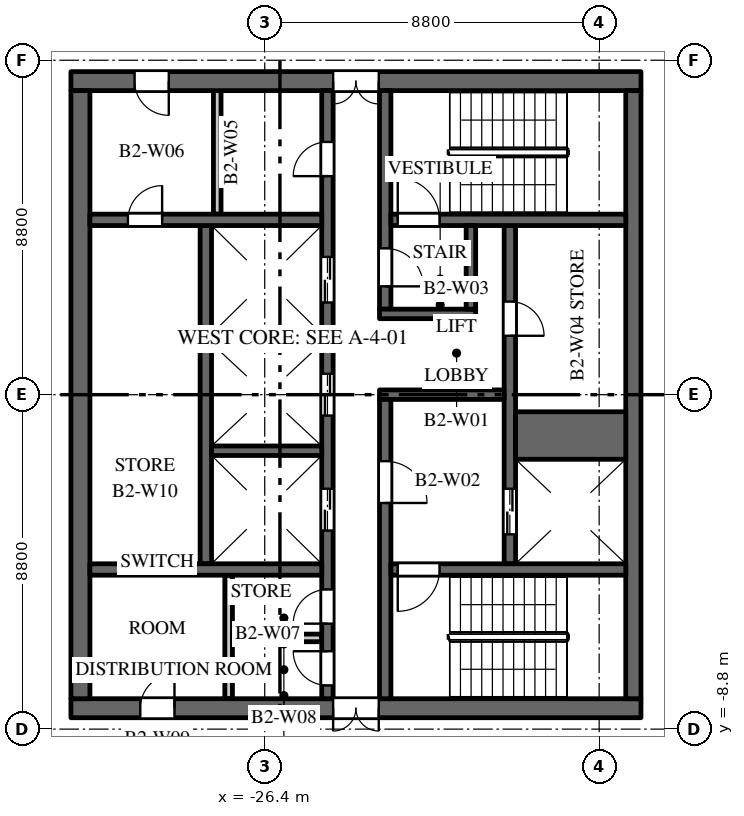
"""IFC4 building model, lengths in metres.
Left out: names, types, materials, properties, quantities, classifications, styles, units other than length and angle.
Written with IfcOpenShell. Run it as: python <this file> out.ifc"""

import sys

from ifc_helpers import new_model, si_unit, direction, frame, frame_2d, origin, place, context, subcontext, project, spatial, rectangle, extrude, element, fill, save


model = new_model("IFC4")
c1 = context("Model", 3, precision=1e-05, world=origin(), true_north=direction((0.0, 1.0)))
c2 = subcontext(c1, "Body", "Model", "MODEL_VIEW")
j1 = project(units=[si_unit("LENGTHUNIT", "METRE"), si_unit("PLANEANGLEUNIT", "RADIAN")], contexts=[c1])
p1 = place(None, origin())
s1 = spatial("IfcSite", under=j1, at=p1, CompositionType="ELEMENT")
p2 = place(p1, origin())
s2 = spatial("IfcBuilding", under=s1, at=p2, CompositionType="ELEMENT")
p3 = place(p2, frame((0.0, 0.0, -8.4)))
s3 = spatial("IfcBuildingStorey", under=s2, at=p3, CompositionType="ELEMENT", Elevation=-8.4)
p4 = place(p3, frame((-16.5, 8.25, 0.0), z_axis=(0.0, 0.0, 1.0), x_axis=(-1.0, 0.0, 0.0)))
e1 = element("IfcWall", 1, at=p4, inside=s3, PredefinedType="SHEAR", context=c2, shape_type="SweptSolid", body=[
    extrude(rectangle(XDim=15.0, YDim=0.5, at=frame_2d((7.5, 0.0))), origin(), (0.0, 0.0, 1.0), 3.9),
])
p5 = place(p4, frame((6.9, 0.0, 0.0)))
e2 = element("IfcOpeningElement", 2, at=p5, cuts=e1, PredefinedType="OPENING", context=c2, shape_type="SweptSolid", body=[
    extrude(rectangle(XDim=1.2, YDim=2.1, at=frame_2d((0.6, 1.05))), frame((0.0, 0.26, 0.0), z_axis=(0.0, -1.0, 0.0), x_axis=(1.0, 0.0, 0.0)), (0.0, 0.0, 1.0), 0.52),
])
p6 = place(p4, frame((12.425, 0.0, 0.0)))
e3 = element("IfcOpeningElement", 3, at=p6, cuts=e1, PredefinedType="OPENING", context=c2, shape_type="SweptSolid", body=[
    extrude(rectangle(XDim=0.9, YDim=2.1, at=frame_2d((0.45, 1.05))), frame((0.0, 0.26, 0.0), z_axis=(0.0, -1.0, 0.0), x_axis=(1.0, 0.0, 0.0)), (0.0, 0.0, 1.0), 0.52),
])
p7 = place(p3, frame((-16.5, -8.25, 0.0), z_axis=(0.0, 0.0, 1.0), x_axis=(-1.0, 0.0, 0.0)))
e4 = element("IfcWall", 4, at=p7, inside=s3, PredefinedType="SHEAR", context=c2, shape_type="SweptSolid", body=[
    extrude(rectangle(XDim=15.0, YDim=0.5, at=frame_2d((7.5, 0.0))), origin(), (0.0, 0.0, 1.0), 3.9),
])
p8 = place(p7, frame((6.9, 0.0, 0.0)))
e5 = element("IfcOpeningElement", 5, at=p8, cuts=e4, PredefinedType="OPENING", context=c2, shape_type="SweptSolid", body=[
    extrude(rectangle(XDim=1.2, YDim=2.1, at=frame_2d((0.6, 1.05))), frame((0.0, 0.26, 0.0), z_axis=(0.0, -1.0, 0.0), x_axis=(1.0, 0.0, 0.0)), (0.0, 0.0, 1.0), 0.52),
])
p9 = place(p7, frame((12.275, 0.0, 0.0)))
e6 = element("IfcOpeningElement", 6, at=p9, cuts=e4, PredefinedType="OPENING", context=c2, shape_type="SweptSolid", body=[
    extrude(rectangle(XDim=0.9, YDim=2.1, at=frame_2d((0.45, 1.05))), frame((0.0, 0.26, 0.0), z_axis=(0.0, -1.0, 0.0), x_axis=(1.0, 0.0, 0.0)), (0.0, 0.0, 1.0), 0.52),
])
p10 = place(p3, frame((-27.95, -4.45, 0.0), z_axis=(0.0, 0.0, 1.0), x_axis=(0.0, 1.0, 0.0)))
e7 = element("IfcWall", 7, at=p10, inside=s3, PredefinedType="SHEAR", context=c2, shape_type="SweptSolid", body=[
    extrude(rectangle(XDim=8.9, YDim=0.3, at=frame_2d((4.45, 0.0))), origin(), (0.0, 0.0, 1.0), 3.9),
])
p11 = place(p3, frame((-19.95, -4.45, 0.0), z_axis=(0.0, 0.0, 1.0), x_axis=(0.0, 1.0, 0.0)))
e8 = element("IfcWall", 8, at=p11, inside=s3, PredefinedType="SHEAR", context=c2, shape_type="SweptSolid", body=[
    extrude(rectangle(XDim=8.9, YDim=0.3, at=frame_2d((4.45, 0.0))), origin(), (0.0, 0.0, 1.0), 3.9),
])
p12 = place(p11, frame((0.775, 0.0, 0.0)))
e9 = element("IfcOpeningElement", 9, at=p12, cuts=e8, PredefinedType="OPENING", context=c2, shape_type="SweptSolid", body=[
    extrude(rectangle(XDim=1.2, YDim=2.1, at=frame_2d((0.6, 1.05))), frame((0.0, 0.16, 0.0), z_axis=(0.0, -1.0, 0.0), x_axis=(1.0, 0.0, 0.0)), (0.0, 0.0, 1.0), 0.32),
])
p13 = place(p11, frame((6.0, 0.0, 0.0)))
e10 = element("IfcOpeningElement", 10, at=p13, cuts=e8, PredefinedType="OPENING", context=c2, shape_type="SweptSolid", body=[
    extrude(rectangle(XDim=0.9, YDim=2.1, at=frame_2d((0.45, 1.05))), frame((0.0, 0.16, 0.0), z_axis=(0.0, -1.0, 0.0), x_axis=(1.0, 0.0, 0.0)), (0.0, 0.0, 1.0), 0.32),
])
p14 = place(p3, frame((-24.75, -8.0, 0.0), z_axis=(0.0, 0.0, 1.0), x_axis=(0.0, 1.0, 0.0)))
e11 = element("IfcWall", 11, at=p14, inside=s3, PredefinedType="SHEAR", context=c2, shape_type="SweptSolid", body=[
    extrude(rectangle(XDim=16.0, YDim=0.3, at=frame_2d((8.0, 0.0))), origin(), (0.0, 0.0, 1.0), 3.9),
])
p15 = place(p14, frame((4.425, 0.0, 0.0)))
e12 = element("IfcOpeningElement", 12, at=p15, cuts=e11, PredefinedType="OPENING", context=c2, shape_type="SweptSolid", body=[
    extrude(rectangle(XDim=1.1, YDim=2.1, at=frame_2d((0.55, 1.05))), frame((0.0, 0.16, 0.0), z_axis=(0.0, -1.0, 0.0), x_axis=(1.0, 0.0, 0.0)), (0.0, 0.0, 1.0), 0.32),
])
p16 = place(p14, frame((7.45, 0.0, 0.0)))
e13 = element("IfcOpeningElement", 13, at=p16, cuts=e11, PredefinedType="OPENING", context=c2, shape_type="SweptSolid", body=[
    extrude(rectangle(XDim=1.1, YDim=2.1, at=frame_2d((0.55, 1.05))), frame((0.0, 0.16, 0.0), z_axis=(0.0, -1.0, 0.0), x_axis=(1.0, 0.0, 0.0)), (0.0, 0.0, 1.0), 0.32),
])
p17 = place(p14, frame((10.425, 0.0, 0.0)))
e14 = element("IfcOpeningElement", 14, at=p17, cuts=e11, PredefinedType="OPENING", context=c2, shape_type="SweptSolid", body=[
    extrude(rectangle(XDim=1.2, YDim=2.1, at=frame_2d((0.6, 1.05))), frame((0.0, 0.16, 0.0), z_axis=(0.0, -1.0, 0.0), x_axis=(1.0, 0.0, 0.0)), (0.0, 0.0, 1.0), 0.32),
])
p18 = place(p14, frame((13.75, 0.0, 0.0)))
e15 = element("IfcOpeningElement", 15, at=p18, cuts=e11, PredefinedType="OPENING", context=c2, shape_type="SweptSolid", body=[
    extrude(rectangle(XDim=0.9, YDim=2.1, at=frame_2d((0.45, 1.05))), frame((0.0, 0.16, 0.0), z_axis=(0.0, -1.0, 0.0), x_axis=(1.0, 0.0, 0.0)), (0.0, 0.0, 1.0), 0.32),
])
p19 = place(p14, frame((1.975, 0.0, 0.0)))
e16 = element("IfcOpeningElement", 16, at=p19, cuts=e11, PredefinedType="OPENING", context=c2, shape_type="SweptSolid", body=[
    extrude(rectangle(XDim=0.9, YDim=2.1, at=frame_2d((0.45, 1.05))), frame((0.0, 0.16, 0.0), z_axis=(0.0, -1.0, 0.0), x_axis=(1.0, 0.0, 0.0)), (0.0, 0.0, 1.0), 0.32),
])
p20 = place(p14, frame((0.35, 0.0, 0.0)))
e17 = element("IfcOpeningElement", 17, at=p20, cuts=e11, PredefinedType="OPENING", context=c2, shape_type="SweptSolid", body=[
    extrude(rectangle(XDim=0.9, YDim=2.1, at=frame_2d((0.45, 1.05))), frame((0.0, 0.16, 0.0), z_axis=(0.0, -1.0, 0.0), x_axis=(1.0, 0.0, 0.0)), (0.0, 0.0, 1.0), 0.32),
])
p21 = place(p3, frame((-20.1, 0.0, 0.0), z_axis=(0.0, 0.0, 1.0), x_axis=(-1.0, 0.0, 0.0)))
e18 = element("IfcWall", 18, at=p21, inside=s3, PredefinedType="SHEAR", context=c2, shape_type="SweptSolid", body=[
    extrude(rectangle(XDim=3.28, YDim=0.25, at=frame_2d((1.64, 0.0))), origin(), (0.0, 0.0, 1.0), 3.9),
])
p22 = place(p3, frame((-16.7, -8.0, 0.0), z_axis=(0.0, 0.0, 1.0), x_axis=(0.0, 1.0, 0.0)))
e19 = element("IfcWall", 19, at=p22, inside=s3, PredefinedType="SHEAR", context=c2, shape_type="SweptSolid", body=[
    extrude(rectangle(XDim=16.0, YDim=0.4, at=frame_2d((8.0, 0.0))), origin(), (0.0, 0.0, 1.0), 3.9),
])
p23 = place(p3, frame((-31.25, -8.0, 0.0), z_axis=(0.0, 0.0, 1.0), x_axis=(0.0, 1.0, 0.0)))
e20 = element("IfcWall", 20, at=p23, inside=s3, PredefinedType="SHEAR", context=c2, shape_type="SweptSolid", body=[
    extrude(rectangle(XDim=16.0, YDim=0.5, at=frame_2d((8.0, 0.0))), origin(), (0.0, 0.0, 1.0), 3.9),
])
p24 = place(p3, frame((-24.9, 4.6, 0.0), z_axis=(0.0, 0.0, 1.0), x_axis=(-1.0, 0.0, 0.0)))
e21 = element("IfcWall", 21, at=p24, inside=s3, PredefinedType="SHEAR", context=c2, shape_type="SweptSolid", body=[
    extrude(rectangle(XDim=6.1, YDim=0.3, at=frame_2d((3.05, 0.0))), origin(), (0.0, 0.0, 1.0), 3.9),
])
p25 = place(p24, frame((4.2, 0.0, 0.0)))
e22 = element("IfcOpeningElement", 22, at=p25, cuts=e21, PredefinedType="OPENING", context=c2, shape_type="SweptSolid", body=[
    extrude(rectangle(XDim=0.9, YDim=2.1, at=frame_2d((0.45, 1.05))), frame((0.0, 0.16, 0.0), z_axis=(0.0, -1.0, 0.0), x_axis=(1.0, 0.0, 0.0)), (0.0, 0.0, 1.0), 0.32),
])
for number, where, z_axis, x_axis in (
    (23, (-27.65, 4.75, 0.0), (0.0, 0.0, 1.0), (0.0, 1.0, 0.0)),
    (24, (-27.35, -8.0, 0.0), (0.0, 0.0, 1.0), (0.0, 1.0, 0.0)),
):
    element("IfcWall", number, at=place(p3, frame(where, z_axis=z_axis, x_axis=x_axis)), inside=s3, PredefinedType="PARTITIONING", context=c2, shape_type="SweptSolid", body=[
        extrude(rectangle(XDim=3.25, YDim=0.2, at=frame_2d((1.625, 0.0))), origin(), (0.0, 0.0, 1.0), 3.9),
    ])
p26 = place(p3, frame((-24.9, -6.4, 0.0), z_axis=(0.0, 0.0, 1.0), x_axis=(-1.0, 0.0, 0.0)))
e25 = element("IfcWall", 25, at=p26, inside=s3, PredefinedType="PARTITIONING", context=c2, shape_type="SweptSolid", body=[
    extrude(rectangle(XDim=2.35, YDim=0.2, at=frame_2d((1.175, 0.0))), origin(), (0.0, 0.0, 1.0), 3.9),
])
p27 = place(p3, frame((-24.9, -4.6, 0.0), z_axis=(0.0, 0.0, 1.0), x_axis=(-1.0, 0.0, 0.0)))
e26 = element("IfcWall", 26, at=p27, inside=s3, PredefinedType="SHEAR", context=c2, shape_type="SweptSolid", body=[
    extrude(rectangle(XDim=6.1, YDim=0.3, at=frame_2d((3.05, 0.0))), origin(), (0.0, 0.0, 1.0), 3.9),
])
p28 = place(p3, frame((-16.9, -1.075, 0.0), z_axis=(0.0, 0.0, 1.0), x_axis=(-1.0, 0.0, 0.0)))
e27 = element("IfcWall", 27, at=p28, inside=s3, PredefinedType="SHEAR", context=c2, shape_type="SweptSolid", body=[
    extrude(rectangle(XDim=2.9, YDim=1.25, at=frame_2d((1.45, 0.0))), origin(), (0.0, 0.0, 1.0), 3.9),
])
for number, where, z_axis, x_axis in (
    (28, (-24.9, -1.475, 0.0), (0.0, 0.0, 1.0), (-1.0, 0.0, 0.0)),
    (29, (-24.9, 1.475, 0.0), (0.0, 0.0, 1.0), (-1.0, 0.0, 0.0)),
):
    element("IfcWall", number, at=place(p3, frame(where, z_axis=z_axis, x_axis=x_axis)), inside=s3, PredefinedType="SHEAR", context=c2, shape_type="SweptSolid", body=[
        extrude(rectangle(XDim=2.9, YDim=0.25, at=frame_2d((1.45, 0.0))), origin(), (0.0, 0.0, 1.0), 3.9),
    ])
p29 = place(p3, frame((-23.23, 2.25, 0.0), z_axis=(0.0, 0.0, 1.0), x_axis=(0.0, 1.0, 0.0)))
e30 = element("IfcWall", 30, at=p29, inside=s3, PredefinedType="SHEAR", context=c2, shape_type="SweptSolid", body=[
    extrude(rectangle(XDim=5.75, YDim=0.3, at=frame_2d((2.875, 0.0))), origin(), (0.0, 0.0, 1.0), 3.9),
])
p30 = place(p29, frame((0.6, 0.0, 0.0)))
e31 = element("IfcOpeningElement", 31, at=p30, cuts=e30, PredefinedType="OPENING", context=c2, shape_type="SweptSolid", body=[
    extrude(rectangle(XDim=1.0, YDim=2.1, at=frame_2d((0.5, 1.05))), frame((0.0, 0.16, 0.0), z_axis=(0.0, -1.0, 0.0), x_axis=(1.0, 0.0, 0.0)), (0.0, 0.0, 1.0), 0.32),
])
p31 = place(p3, frame((-23.23, -8.0, 0.0), z_axis=(0.0, 0.0, 1.0), x_axis=(0.0, 1.0, 0.0)))
e32 = element("IfcWall", 32, at=p31, inside=s3, PredefinedType="SHEAR", context=c2, shape_type="SweptSolid", body=[
    extrude(rectangle(XDim=7.875, YDim=0.3, at=frame_2d((3.938, 0.0))), origin(), (0.0, 0.0, 1.0), 3.9),
])
p32 = place(p31, frame((5.15, 0.0, 0.0)))
e33 = element("IfcOpeningElement", 33, at=p32, cuts=e32, PredefinedType="OPENING", context=c2, shape_type="SweptSolid", body=[
    extrude(rectangle(XDim=1.1, YDim=2.1, at=frame_2d((0.55, 1.05))), frame((0.0, 0.16, 0.0), z_axis=(0.0, -1.0, 0.0), x_axis=(1.0, 0.0, 0.0)), (0.0, 0.0, 1.0), 0.32),
])
p33 = place(p3, frame((-16.9, 4.6, 0.0), z_axis=(0.0, 0.0, 1.0), x_axis=(-1.0, 0.0, 0.0)))
e34 = element("IfcWall", 34, at=p33, inside=s3, PredefinedType="SHEAR", context=c2, shape_type="SweptSolid", body=[
    extrude(rectangle(XDim=6.18, YDim=0.3, at=frame_2d((3.09, 0.0))), origin(), (0.0, 0.0, 1.0), 3.9),
])
p34 = place(p33, frame((4.9, 0.0, 0.0)))
e35 = element("IfcOpeningElement", 35, at=p34, cuts=e34, PredefinedType="OPENING", context=c2, shape_type="SweptSolid", body=[
    extrude(rectangle(XDim=1.1, YDim=2.1, at=frame_2d((0.55, 1.05))), frame((0.0, 0.16, 0.0), z_axis=(0.0, -1.0, 0.0), x_axis=(1.0, 0.0, 0.0)), (0.0, 0.0, 1.0), 0.32),
])
p35 = place(p3, frame((-16.9, -4.6, 0.0), z_axis=(0.0, 0.0, 1.0), x_axis=(-1.0, 0.0, 0.0)))
e36 = element("IfcWall", 36, at=p35, inside=s3, PredefinedType="SHEAR", context=c2, shape_type="SweptSolid", body=[
    extrude(rectangle(XDim=6.18, YDim=0.3, at=frame_2d((3.09, 0.0))), origin(), (0.0, 0.0, 1.0), 3.9),
])
p36 = place(p35, frame((4.9, 0.0, 0.0)))
e37 = element("IfcOpeningElement", 37, at=p36, cuts=e36, PredefinedType="OPENING", context=c2, shape_type="SweptSolid", body=[
    extrude(rectangle(XDim=1.1, YDim=2.1, at=frame_2d((0.55, 1.05))), frame((0.0, 0.16, 0.0), z_axis=(0.0, -1.0, 0.0), x_axis=(1.0, 0.0, 0.0)), (0.0, 0.0, 1.0), 0.32),
])
p37 = place(p3, frame((-20.85, 2.125, 0.0), z_axis=(0.0, 0.0, 1.0), x_axis=(-1.0, 0.0, 0.0)))
e38 = element("IfcWall", 38, at=p37, inside=s3, PredefinedType="SHEAR", context=c2, shape_type="SweptSolid", body=[
    extrude(rectangle(XDim=2.53, YDim=0.25, at=frame_2d((1.265, 0.0))), origin(), (0.0, 0.0, 1.0), 3.9),
])
p38 = place(p3, frame((-20.975, 2.25, 0.0), z_axis=(0.0, 0.0, 1.0), x_axis=(0.0, 1.0, 0.0)))
e39 = element("IfcWall", 39, at=p38, inside=s3, PredefinedType="SHEAR", context=c2, shape_type="SweptSolid", body=[
    extrude(rectangle(XDim=2.2, YDim=0.25, at=frame_2d((1.1, 0.0))), origin(), (0.0, 0.0, 1.0), 3.9),
])
p39 = place(p3, frame((-31.157, 11.729, 0.0), z_axis=(0.0, 0.0, 1.0), x_axis=(-0.462265314279, -0.886741664305, 0.0)))
e40 = element("IfcWall", 40, at=p39, inside=s3, PredefinedType="SOLIDWALL", context=c2, shape_type="SweptSolid", body=[
    extrude(rectangle(XDim=4.135, YDim=0.25, at=frame_2d((2.067, 0.0))), origin(), (0.0, 0.0, 1.0), 3.0),
])
p40 = place(p39, frame((1.467, 0.0, 0.0)))
e41 = element("IfcOpeningElement", 41, at=p40, cuts=e40, PredefinedType="OPENING", context=c2, shape_type="SweptSolid", body=[
    extrude(rectangle(XDim=1.2, YDim=2.1, at=frame_2d((0.6, 1.05))), frame((0.0, 0.135, 0.0), z_axis=(0.0, -1.0, 0.0), x_axis=(1.0, 0.0, 0.0)), (0.0, 0.0, 1.0), 0.27),
])
p41 = place(p3, frame((-33.069, -8.062, 0.0), z_axis=(0.0, 0.0, 1.0), x_axis=(0.462265314279, -0.886741664305, 0.0)))
e42 = element("IfcWall", 42, at=p41, inside=s3, PredefinedType="SOLIDWALL", context=c2, shape_type="SweptSolid", body=[
    extrude(rectangle(XDim=4.135, YDim=0.25, at=frame_2d((2.067, 0.0))), origin(), (0.0, 0.0, 1.0), 3.0),
])
p42 = place(p12, origin())
e43 = element("IfcDoor", 43, at=p42, inside=s3, OperationType="DOUBLE_DOOR_SLIDING", PredefinedType="DOOR", context=c2, shape_type="SweptSolid", body=[
    extrude(rectangle(XDim=1.2, YDim=2.1, at=frame_2d((0.6, 1.05))), frame((0.0, 0.025, 0.0), z_axis=(0.0, -1.0, 0.0), x_axis=(1.0, 0.0, 0.0)), (0.0, 0.0, 1.0), 0.05),
])
fill(e9, e43)
p43 = place(p15, origin())
e44 = element("IfcDoor", 44, at=p43, inside=s3, OperationType="DOUBLE_DOOR_SLIDING", PredefinedType="DOOR", context=c2, shape_type="SweptSolid", body=[
    extrude(rectangle(XDim=1.1, YDim=2.1, at=frame_2d((0.55, 1.05))), frame((0.0, 0.025, 0.0), z_axis=(0.0, -1.0, 0.0), x_axis=(1.0, 0.0, 0.0)), (0.0, 0.0, 1.0), 0.05),
])
fill(e12, e44)
p44 = place(p16, origin())
e45 = element("IfcDoor", 45, at=p44, inside=s3, OperationType="DOUBLE_DOOR_SLIDING", PredefinedType="DOOR", context=c2, shape_type="SweptSolid", body=[
    extrude(rectangle(XDim=1.1, YDim=2.1, at=frame_2d((0.55, 1.05))), frame((0.0, 0.025, 0.0), z_axis=(0.0, -1.0, 0.0), x_axis=(1.0, 0.0, 0.0)), (0.0, 0.0, 1.0), 0.05),
])
fill(e13, e45)
p45 = place(p17, origin())
e46 = element("IfcDoor", 46, at=p45, inside=s3, OperationType="DOUBLE_DOOR_SLIDING", PredefinedType="DOOR", context=c2, shape_type="SweptSolid", body=[
    extrude(rectangle(XDim=1.2, YDim=2.1, at=frame_2d((0.6, 1.05))), frame((0.0, 0.025, 0.0), z_axis=(0.0, -1.0, 0.0), x_axis=(1.0, 0.0, 0.0)), (0.0, 0.0, 1.0), 0.05),
])
fill(e14, e46)
p46 = place(p34, origin())
e47 = element("IfcDoor", 47, at=p46, inside=s3, OperationType="SINGLE_SWING_RIGHT", PredefinedType="DOOR", context=c2, shape_type="SweptSolid", body=[
    extrude(rectangle(XDim=1.1, YDim=2.1, at=frame_2d((0.55, 1.05))), frame((0.0, 0.025, 0.0), z_axis=(0.0, -1.0, 0.0), x_axis=(1.0, 0.0, 0.0)), (0.0, 0.0, 1.0), 0.05),
])
fill(e35, e47)
p47 = place(p36, origin())
e48 = element("IfcDoor", 48, at=p47, inside=s3, OperationType="SINGLE_SWING_LEFT", PredefinedType="DOOR", context=c2, shape_type="SweptSolid", body=[
    extrude(rectangle(XDim=1.1, YDim=2.1, at=frame_2d((0.55, 1.05))), frame((0.0, 0.025, 0.0), z_axis=(0.0, -1.0, 0.0), x_axis=(1.0, 0.0, 0.0)), (0.0, 0.0, 1.0), 0.05),
])
fill(e37, e48)
p48 = place(p32, origin())
e49 = element("IfcDoor", 49, at=p48, inside=s3, OperationType="SINGLE_SWING_LEFT", PredefinedType="DOOR", context=c2, shape_type="SweptSolid", body=[
    extrude(rectangle(XDim=1.1, YDim=2.1, at=frame_2d((0.55, 1.05))), frame((0.0, 0.025, 0.0), z_axis=(0.0, -1.0, 0.0), x_axis=(1.0, 0.0, 0.0)), (0.0, 0.0, 1.0), 0.05),
])
fill(e33, e49)
p49 = place(p30, origin())
e50 = element("IfcDoor", 50, at=p49, inside=s3, OperationType="SINGLE_SWING_LEFT", PredefinedType="DOOR", context=c2, shape_type="SweptSolid", body=[
    extrude(rectangle(XDim=1.0, YDim=2.1, at=frame_2d((0.5, 1.05))), frame((0.0, 0.025, 0.0), z_axis=(0.0, -1.0, 0.0), x_axis=(1.0, 0.0, 0.0)), (0.0, 0.0, 1.0), 0.05),
])
fill(e31, e50)
p50 = place(p5, origin())
e51 = element("IfcDoor", 51, at=p50, inside=s3, OperationType="DOUBLE_DOOR_DOUBLE_SWING", PredefinedType="DOOR", context=c2, shape_type="SweptSolid", body=[
    extrude(rectangle(XDim=1.2, YDim=2.1, at=frame_2d((0.6, 1.05))), frame((0.0, 0.025, 0.0), z_axis=(0.0, -1.0, 0.0), x_axis=(1.0, 0.0, 0.0)), (0.0, 0.0, 1.0), 0.05),
])
fill(e2, e51)
p51 = place(p8, origin())
e52 = element("IfcDoor", 52, at=p51, inside=s3, OperationType="DOUBLE_DOOR_DOUBLE_SWING", PredefinedType="DOOR", context=c2, shape_type="SweptSolid", body=[
    extrude(rectangle(XDim=1.2, YDim=2.1, at=frame_2d((0.6, 1.05))), frame((0.0, 0.025, 0.0), z_axis=(0.0, -1.0, 0.0), x_axis=(1.0, 0.0, 0.0)), (0.0, 0.0, 1.0), 0.05),
])
fill(e5, e52)
p52 = place(p13, origin())
e53 = element("IfcDoor", 53, at=p52, inside=s3, OperationType="SINGLE_SWING_LEFT", PredefinedType="DOOR", context=c2, shape_type="SweptSolid", body=[
    extrude(rectangle(XDim=0.9, YDim=2.1, at=frame_2d((0.45, 1.05))), frame((0.0, 0.025, 0.0), z_axis=(0.0, -1.0, 0.0), x_axis=(1.0, 0.0, 0.0)), (0.0, 0.0, 1.0), 0.05),
])
fill(e10, e53)
p53 = place(p18, origin())
e54 = element("IfcDoor", 54, at=p53, inside=s3, OperationType="SINGLE_SWING_RIGHT", PredefinedType="DOOR", context=c2, shape_type="SweptSolid", body=[
    extrude(rectangle(XDim=0.9, YDim=2.1, at=frame_2d((0.45, 1.05))), frame((0.0, 0.025, 0.0), z_axis=(0.0, -1.0, 0.0), x_axis=(1.0, 0.0, 0.0)), (0.0, 0.0, 1.0), 0.05),
])
fill(e15, e54)
p54 = place(p6, origin())
e55 = element("IfcDoor", 55, at=p54, inside=s3, OperationType="SINGLE_SWING_RIGHT", PredefinedType="DOOR", context=c2, shape_type="SweptSolid", body=[
    extrude(rectangle(XDim=0.9, YDim=2.1, at=frame_2d((0.45, 1.05))), frame((0.0, 0.025, 0.0), z_axis=(0.0, -1.0, 0.0), x_axis=(1.0, 0.0, 0.0)), (0.0, 0.0, 1.0), 0.05),
])
fill(e3, e55)
p55 = place(p19, origin())
e56 = element("IfcDoor", 56, at=p55, inside=s3, OperationType="SINGLE_SWING_RIGHT", PredefinedType="DOOR", context=c2, shape_type="SweptSolid", body=[
    extrude(rectangle(XDim=0.9, YDim=2.1, at=frame_2d((0.45, 1.05))), frame((0.0, 0.025, 0.0), z_axis=(0.0, -1.0, 0.0), x_axis=(1.0, 0.0, 0.0)), (0.0, 0.0, 1.0), 0.05),
])
fill(e16, e56)
p56 = place(p20, origin())
e57 = element("IfcDoor", 57, at=p56, inside=s3, OperationType="SINGLE_SWING_LEFT", PredefinedType="DOOR", context=c2, shape_type="SweptSolid", body=[
    extrude(rectangle(XDim=0.9, YDim=2.1, at=frame_2d((0.45, 1.05))), frame((0.0, 0.025, 0.0), z_axis=(0.0, -1.0, 0.0), x_axis=(1.0, 0.0, 0.0)), (0.0, 0.0, 1.0), 0.05),
])
fill(e17, e57)
p57 = place(p9, origin())
e58 = element("IfcDoor", 58, at=p57, inside=s3, OperationType="SINGLE_SWING_LEFT", PredefinedType="DOOR", context=c2, shape_type="SweptSolid", body=[
    extrude(rectangle(XDim=0.9, YDim=2.1, at=frame_2d((0.45, 1.05))), frame((0.0, 0.025, 0.0), z_axis=(0.0, -1.0, 0.0), x_axis=(1.0, 0.0, 0.0)), (0.0, 0.0, 1.0), 0.05),
])
fill(e6, e58)
p58 = place(p25, origin())
e59 = element("IfcDoor", 59, at=p58, inside=s3, OperationType="SINGLE_SWING_LEFT", PredefinedType="DOOR", context=c2, shape_type="SweptSolid", body=[
    extrude(rectangle(XDim=0.9, YDim=2.1, at=frame_2d((0.45, 1.05))), frame((0.0, 0.025, 0.0), z_axis=(0.0, -1.0, 0.0), x_axis=(1.0, 0.0, 0.0)), (0.0, 0.0, 1.0), 0.05),
])
fill(e22, e59)
save(model, sys.argv[1])
